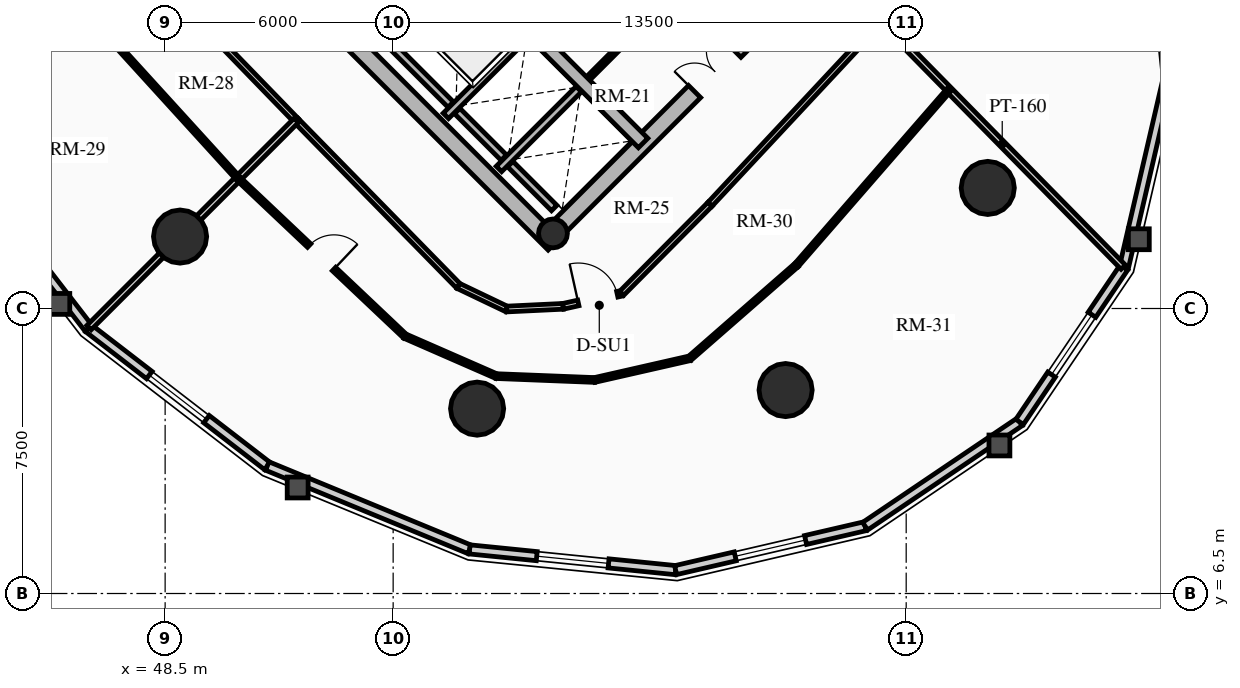
"""IFC4 building model, lengths in metres.
Left out: names, types, materials, properties, quantities, classifications, styles, units other than length and angle.
Written with IfcOpenShell. Run it as: python <this file> out.ifc"""

import sys

from ifc_helpers import new_model, si_unit, direction, frame, frame_2d, origin, origin_2d, place, context, subcontext, project, spatial, rectangle, circle, hollow_circle, extrude, source, transform, mapped, element, fill, save


model = new_model("IFC4")
c1 = context("Model", 3, precision=1e-05, world=origin(), true_north=direction((0.0, 1.0)))
c2 = subcontext(c1, "Body", "Model", "MODEL_VIEW")
j1 = project(units=[si_unit("LENGTHUNIT", "METRE"), si_unit("PLANEANGLEUNIT", "RADIAN")], contexts=[c1])
p1 = place(None, origin())
s1 = spatial("IfcSite", under=j1, at=p1, CompositionType="ELEMENT")
p2 = place(p1, origin())
s2 = spatial("IfcBuilding", under=s1, at=p2, CompositionType="ELEMENT")
p3 = place(p2, frame((0.0, 0.0, 90.52)))
s3 = spatial("IfcBuildingStorey", under=s2, at=p3, CompositionType="ELEMENT", Elevation=90.52)
p4 = place(p3, frame((58.737, 15.697, 0.0), z_axis=(0.0, 0.0, 1.0), x_axis=(-0.707106781187, 0.707106781187, 0.0)))
e1 = element("IfcWall", 1, at=p4, inside=s3, PredefinedType="SHEAR", context=c2, shape_type="SweptSolid", body=[
    extrude(rectangle(XDim=14.2, YDim=0.45, at=frame_2d((7.1, 0.0))), origin(), (0.0, 0.0, 1.0), 2.91),
])
p5 = place(p3, frame((58.578, 15.856, 0.0), z_axis=(0.0, 0.0, 1.0), x_axis=(0.707106781187, 0.707106781187, 0.0)))
e2 = element("IfcWall", 2, at=p5, inside=s3, PredefinedType="SHEAR", context=c2, shape_type="SweptSolid", body=[
    extrude(rectangle(XDim=10.7, YDim=0.45, at=frame_2d((5.35, 0.0))), origin(), (0.0, 0.0, 1.0), 2.91),
])
m1 = source(origin(), c2, "Body", "SweptSolid", [
    extrude(rectangle(XDim=1.5, YDim=2.02, at=frame_2d((0.75, 1.01))), frame((0.0, 0.235, 0.0), z_axis=(0.0, -1.0, 0.0), x_axis=(1.0, 0.0, 0.0)), (0.0, 0.0, 1.0), 0.47),
])
p6 = place(p5, frame((5.45, 0.0, 0.0)))
e3 = element("IfcOpeningElement", 3, at=p6, cuts=e2, PredefinedType="OPENING", context=c2, shape_type="MappedRepresentation", body=[
    mapped(m1, transform((0.0, 0.0, 0.0), x_axis=(1.0, 0.0, 0.0), y_axis=(0.0, 1.0, 0.0), z_axis=(0.0, 0.0, 1.0), scale=1.0)),
])
p7 = place(p3, frame((61.078, 18.355, 0.0), z_axis=(0.0, 0.0, 1.0), x_axis=(-0.707106781187, 0.707106781187, 0.0)))
e4 = element("IfcWall", 4, at=p7, inside=s3, PredefinedType="SHEAR", context=c2, shape_type="SweptSolid", body=[
    extrude(rectangle(XDim=13.75, YDim=0.35, at=frame_2d((6.875, 0.0))), origin(), (0.0, 0.0, 1.0), 2.91),
])
m2 = source(origin(), c2, "Body", "SweptSolid", [
    extrude(rectangle(XDim=1.1, YDim=2.015, at=frame_2d((0.55, 1.007))), frame((0.0, 0.185, 0.0), z_axis=(0.0, -1.0, 0.0), x_axis=(1.0, 0.0, 0.0)), (0.0, 0.0, 1.0), 0.37),
])
p8 = place(p7, frame((4.875, 0.0, 0.0)))
e5 = element("IfcOpeningElement", 5, at=p8, cuts=e4, PredefinedType="OPENING", context=c2, shape_type="MappedRepresentation", body=[
    mapped(m2, transform((0.0, 0.0, 0.0), x_axis=(1.0, 0.0, 0.0), y_axis=(0.0, 1.0, 0.0), z_axis=(0.0, 0.0, 1.0), scale=1.0)),
])
m3 = source(origin(), c2, "Body", "SweptSolid", [
    extrude(rectangle(XDim=1.15, YDim=2.02, at=frame_2d((0.575, 1.01))), frame((0.0, 0.185, 0.0), z_axis=(0.0, -1.0, 0.0), x_axis=(1.0, 0.0, 0.0)), (0.0, 0.0, 1.0), 0.37),
])
p9 = place(p7, frame((7.295, 0.0, 0.0)))
e6 = element("IfcOpeningElement", 6, at=p9, cuts=e4, PredefinedType="OPENING", context=c2, shape_type="MappedRepresentation", body=[
    mapped(m3, transform((0.0, 0.0, 0.0), x_axis=(1.0, 0.0, 0.0), y_axis=(0.0, 1.0, 0.0), z_axis=(0.0, 0.0, 1.0), scale=1.0)),
])
p10 = place(p3, frame((58.706, 15.976, 0.0), z_axis=(0.0, 0.0, 1.0), x_axis=(0.707106781187, 0.707106781187, 0.0)))
e7 = element("IfcColumn", 7, at=p10, inside=s3, PredefinedType="COLUMN", context=c2, shape_type="SweptSolid", body=[
    extrude(hollow_circle(Radius=0.38, WallThickness=0.032, at=origin_2d()), origin(), (0.0, 0.0, 1.0), 2.91),
])
for number, where, z_axis, x_axis in (
    (8, (48.893, 15.893, 0.0), (0.0, 0.0, 1.0), (1.0, 0.0, 0.0)),
    (9, (56.709, 11.365, 0.0), (0.0, 0.0, 1.0), (1.0, 0.0, 0.0)),
    (10, (64.827, 11.854, 0.0), (0.0, 0.0, 1.0), (1.0, 0.0, 0.0)),
    (11, (70.146, 17.173, 0.0), (0.0, 0.0, 1.0), (1.0, 0.0, 0.0)),
):
    element("IfcColumn", number, at=place(p3, frame(where, z_axis=z_axis, x_axis=x_axis)), inside=s3, PredefinedType="USERDEFINED", context=c2, shape_type="SweptSolid", body=[
        extrude(circle(Radius=0.7, at=origin_2d()), origin(), (0.0, 0.0, 1.0), 2.91),
    ])
p11 = place(p3, frame((46.483, 13.483, 0.0), z_axis=(0.0, 0.0, 1.0), x_axis=(-0.61054437102, 0.791982052206, 0.0)))
e12 = element("IfcWall", 12, at=p11, inside=s3, PredefinedType="SOLIDWALL", context=c2, shape_type="SweptSolid", body=[
    extrude(rectangle(XDim=5.942, YDim=0.24, at=frame_2d((2.971, 0.0))), origin(), (0.0, 0.0, 1.0), 2.179),
])
p12 = place(p3, frame((51.189, 9.855, 0.0), z_axis=(0.0, 0.0, 1.0), x_axis=(-0.791982052206, 0.61054437102, 0.0)))
e13 = element("IfcWall", 13, at=p12, inside=s3, PredefinedType="SOLIDWALL", context=c2, shape_type="SweptSolid", body=[
    extrude(rectangle(XDim=5.942, YDim=0.24, at=frame_2d((2.971, 0.0))), origin(), (0.0, 0.0, 1.0), 2.179),
])
m4 = source(origin(), c2, "Body", "SweptSolid", [
    extrude(rectangle(XDim=1.9, YDim=1.35, at=frame_2d((0.95, 0.675))), frame((0.0, 0.13, 0.0), z_axis=(0.0, -1.0, 0.0), x_axis=(1.0, 0.0, 0.0)), (0.0, 0.0, 1.0), 0.26),
])
p13 = place(p12, frame((2.021, 0.0, 0.65)))
e14 = element("IfcOpeningElement", 14, at=p13, cuts=e13, PredefinedType="OPENING", context=c2, shape_type="MappedRepresentation", body=[
    mapped(m4, transform((0.0, 0.0, 0.0), x_axis=(1.0, 0.0, 0.0), y_axis=(0.0, 1.0, 0.0), z_axis=(0.0, 0.0, 1.0), scale=1.0)),
])
p14 = place(p3, frame((56.513, 7.661, 0.0), z_axis=(0.0, 0.0, 1.0), x_axis=(-0.924563909604, 0.381027003055, 0.0)))
e15 = element("IfcWall", 15, at=p14, inside=s3, PredefinedType="SOLIDWALL", context=c2, shape_type="SweptSolid", body=[
    extrude(rectangle(XDim=5.758, YDim=0.24, at=frame_2d((2.879, 0.0))), origin(), (0.0, 0.0, 1.0), 2.179),
])
p15 = place(p3, frame((61.933, 7.115, 0.0), z_axis=(0.0, 0.0, 1.0), x_axis=(-0.994971754311, 0.10015591906, 0.0)))
e16 = element("IfcWall", 16, at=p15, inside=s3, PredefinedType="SOLIDWALL", context=c2, shape_type="SweptSolid", body=[
    extrude(rectangle(XDim=5.448, YDim=0.24, at=frame_2d((2.724, 0.0))), origin(), (0.0, 0.0, 1.0), 2.179),
])
p16 = place(p15, frame((1.774, 0.0, 0.65)))
e17 = element("IfcOpeningElement", 17, at=p16, cuts=e16, PredefinedType="OPENING", context=c2, shape_type="MappedRepresentation", body=[
    mapped(m4, transform((0.0, 0.0, 0.0), x_axis=(1.0, 0.0, 0.0), y_axis=(0.0, 1.0, 0.0), z_axis=(0.0, 0.0, 1.0), scale=1.0)),
])
p17 = place(p3, frame((66.92, 8.271, 0.0), z_axis=(0.0, 0.0, 1.0), x_axis=(-0.974165631126, -0.225834725257, 0.0)))
e18 = element("IfcWall", 18, at=p17, inside=s3, PredefinedType="SOLIDWALL", context=c2, shape_type="SweptSolid", body=[
    extrude(rectangle(XDim=5.119, YDim=0.24, at=frame_2d((2.56, 0.0))), origin(), (0.0, 0.0, 1.0), 2.179),
])
p18 = place(p17, frame((1.609, 0.0, 0.65)))
e19 = element("IfcOpeningElement", 19, at=p18, cuts=e18, PredefinedType="OPENING", context=c2, shape_type="MappedRepresentation", body=[
    mapped(m4, transform((0.0, 0.0, 0.0), x_axis=(1.0, 0.0, 0.0), y_axis=(0.0, 1.0, 0.0), z_axis=(0.0, 0.0, 1.0), scale=1.0)),
])
p19 = place(p3, frame((70.985, 11.015, 0.0), z_axis=(0.0, 0.0, 1.0), x_axis=(-0.828781148131, -0.559572880421, 0.0)))
e20 = element("IfcWall", 20, at=p19, inside=s3, PredefinedType="SOLIDWALL", context=c2, shape_type="SweptSolid", body=[
    extrude(rectangle(XDim=4.905, YDim=0.24, at=frame_2d((2.452, 0.0))), origin(), (0.0, 0.0, 1.0), 2.179),
])
p20 = place(p3, frame((73.729, 15.08, 0.0), z_axis=(0.0, 0.0, 1.0), x_axis=(-0.559572880421, -0.828781148131, 0.0)))
e21 = element("IfcWall", 21, at=p20, inside=s3, PredefinedType="SOLIDWALL", context=c2, shape_type="SweptSolid", body=[
    extrude(rectangle(XDim=4.905, YDim=0.24, at=frame_2d((2.452, 0.0))), origin(), (0.0, 0.0, 1.0), 2.179),
])
p21 = place(p20, frame((1.502, 0.0, 0.65)))
e22 = element("IfcOpeningElement", 22, at=p21, cuts=e21, PredefinedType="OPENING", context=c2, shape_type="MappedRepresentation", body=[
    mapped(m4, transform((0.0, 0.0, 0.0), x_axis=(1.0, 0.0, 0.0), y_axis=(0.0, 1.0, 0.0), z_axis=(0.0, 0.0, 1.0), scale=1.0)),
])
p22 = place(p3, frame((74.885, 20.067, 0.0), z_axis=(0.0, 0.0, 1.0), x_axis=(-0.225834725257, -0.974165631126, 0.0)))
e23 = element("IfcWall", 23, at=p22, inside=s3, PredefinedType="SOLIDWALL", context=c2, shape_type="SweptSolid", body=[
    extrude(rectangle(XDim=5.119, YDim=0.24, at=frame_2d((2.56, 0.0))), origin(), (0.0, 0.0, 1.0), 2.179),
])
p23 = place(p3, frame((74.339, 25.487, 0.0), z_axis=(0.0, 0.0, 1.0), x_axis=(0.10015591906, -0.994971754311, 0.0)))
e24 = element("IfcWall", 24, at=p23, inside=s3, PredefinedType="SOLIDWALL", context=c2, shape_type="SweptSolid", body=[
    extrude(rectangle(XDim=5.448, YDim=0.24, at=frame_2d((2.724, 0.0))), origin(), (0.0, 0.0, 1.0), 2.179),
])
m5 = source(origin(), c2, "Body", "SweptSolid", [
    extrude(rectangle(XDim=2.2, YDim=1.35, at=frame_2d((1.1, 0.675))), frame((0.0, 0.13, 0.0), z_axis=(0.0, -1.0, 0.0), x_axis=(1.0, 0.0, 0.0)), (0.0, 0.0, 1.0), 0.26),
])
p24 = place(p23, frame((1.624, 0.0, 0.65)))
e25 = element("IfcOpeningElement", 25, at=p24, cuts=e24, PredefinedType="OPENING", context=c2, shape_type="MappedRepresentation", body=[
    mapped(m5, transform((0.0, 0.0, 0.0), x_axis=(1.0, 0.0, 0.0), y_axis=(0.0, 1.0, 0.0), z_axis=(0.0, 0.0, 1.0), scale=1.0)),
])
p25 = place(p3, frame((55.888, 19.069, 0.0), z_axis=(0.0, 0.0, 1.0), x_axis=(0.707106781187, 0.707106781187, 0.0)))
e26 = element("IfcWall", 26, at=p25, inside=s3, PredefinedType="SHEAR", context=c2, shape_type="SweptSolid", body=[
    extrude(rectangle(XDim=2.97, YDim=0.2, at=frame_2d((1.485, 0.0))), origin(), (0.0, 0.0, 1.0), 2.91),
])
p26 = place(p3, frame((56.015, 19.366, 0.0), z_axis=(0.0, 0.0, 1.0), x_axis=(-0.707106781187, 0.707106781187, 0.0)))
e27 = element("IfcWall", 27, at=p26, inside=s3, PredefinedType="SHEAR", context=c2, shape_type="SweptSolid", body=[
    extrude(rectangle(XDim=2.44, YDim=0.2, at=frame_2d((1.22, 0.0))), origin(), (0.0, 0.0, 1.0), 2.91),
])
p27 = place(p3, frame((57.284, 17.673, 0.0), z_axis=(0.0, 0.0, 1.0), x_axis=(0.707147878904, 0.70706568108, 0.0)))
e28 = element("IfcWall", 28, at=p27, inside=s3, PredefinedType="SHEAR", context=c2, shape_type="SweptSolid", body=[
    extrude(rectangle(XDim=2.97, YDim=0.2, at=frame_2d((1.485, 0.0))), origin(), (0.0, 0.0, 1.0), 2.91),
])
p28 = place(p3, frame((57.412, 17.97, 0.0), z_axis=(0.0, 0.0, 1.0), x_axis=(-0.707106781187, 0.707106781187, 0.0)))
e29 = element("IfcWall", 29, at=p28, inside=s3, PredefinedType="SHEAR", context=c2, shape_type="SweptSolid", body=[
    extrude(rectangle(XDim=1.735, YDim=0.2, at=frame_2d((0.867, 0.0))), origin(), (0.0, 0.0, 1.0), 2.91),
])
p29 = place(p3, frame((58.737, 16.644, 0.0), z_axis=(0.0, 0.0, 1.0), x_axis=(-0.707032117043, 0.707181437447, 0.0)))
e30 = element("IfcWall", 30, at=p29, inside=s3, PredefinedType="SHEAR", context=c2, shape_type="SweptSolid", body=[
    extrude(rectangle(XDim=1.635, YDim=0.2, at=frame_2d((0.817, 0.0))), origin(), (0.0, 0.0, 1.0), 2.91),
])
p30 = place(p3, frame((59.643, 20.066, 0.0), z_axis=(0.0, 0.0, 1.0), x_axis=(0.707106781187, 0.707106781187, 0.0)))
e31 = element("IfcWall", 31, at=p30, inside=s3, PredefinedType="PARTITIONING", context=c2, shape_type="SweptSolid", body=[
    extrude(rectangle(XDim=1.1, YDim=0.125, at=frame_2d((0.55, 0.0))), origin(), (0.0, 0.0, 1.0), 2.655),
])
p31 = place(p3, frame((47.786, 23.242, 0.0), z_axis=(0.0, 0.0, 1.0), x_axis=(0.696183456981, -0.717863910659, 0.0)))
e32 = element("IfcWall", 32, at=p31, inside=s3, PredefinedType="PARTITIONING", context=c2, shape_type="SweptSolid", body=[
    extrude(rectangle(XDim=5.979, YDim=0.15, at=frame_2d((2.99, 0.0))), origin(), (0.0, 0.0, 1.0), 2.655),
])
p32 = place(p3, frame((51.949, 18.949, 0.0), z_axis=(0.0, 0.0, 1.0), x_axis=(0.699801520154, -0.714337337951, 0.0)))
e33 = element("IfcWall", 33, at=p32, inside=s3, PredefinedType="PARTITIONING", context=c2, shape_type="SweptSolid", body=[
    extrude(rectangle(XDim=6.097, YDim=0.15, at=frame_2d((3.048, 0.0))), origin(), (0.0, 0.0, 1.0), 2.225),
])
p33 = place(p3, frame((56.216, 14.594, 0.0), z_axis=(0.0, 0.0, 1.0), x_axis=(0.902219207281, -0.431277755064, 0.0)))
e34 = element("IfcWall", 34, at=p33, inside=s3, PredefinedType="PARTITIONING", context=c2, shape_type="SweptSolid", body=[
    extrude(rectangle(XDim=1.41, YDim=0.15, at=frame_2d((0.705, 0.0))), origin(), (0.0, 0.0, 1.0), 2.225),
])
p34 = place(p3, frame((57.488, 13.986, 0.0), z_axis=(0.0, 0.0, 1.0), x_axis=(0.998863298217, 0.047666670476, 0.0)))
e35 = element("IfcWall", 35, at=p34, inside=s3, PredefinedType="PARTITIONING", context=c2, shape_type="SweptSolid", body=[
    extrude(rectangle(XDim=1.485, YDim=0.15, at=frame_2d((0.743, 0.0))), origin(), (0.0, 0.0, 1.0), 2.225),
])
p35 = place(p3, frame((58.971, 14.057, 0.0), z_axis=(0.0, 0.0, 1.0), x_axis=(0.976085233804, 0.217388169756, 0.0)))
e36 = element("IfcWall", 36, at=p35, inside=s3, PredefinedType="PARTITIONING", context=c2, shape_type="SweptSolid", body=[
    extrude(rectangle(XDim=1.581, YDim=0.15, at=frame_2d((0.791, 0.0))), origin(), (0.0, 0.0, 1.0), 2.225),
])
m6 = source(origin(), c2, "Body", "SweptSolid", [
    extrude(rectangle(XDim=1.05, YDim=2.015, at=frame_2d((0.525, 1.007))), frame((0.0, 0.085, 0.0), z_axis=(0.0, -1.0, 0.0), x_axis=(1.0, 0.0, 0.0)), (0.0, 0.0, 1.0), 0.17),
])
p36 = place(p35, frame((0.411, 0.0, 0.0)))
e37 = element("IfcOpeningElement", 37, at=p36, cuts=e36, PredefinedType="OPENING", context=c2, shape_type="MappedRepresentation", body=[
    mapped(m6, transform((0.0, 0.0, 0.0), x_axis=(1.0, 0.0, 0.0), y_axis=(0.0, 1.0, 0.0), z_axis=(0.0, 0.0, 1.0), scale=1.0)),
])
p37 = place(p3, frame((60.515, 14.401, 0.0), z_axis=(0.0, 0.0, 1.0), x_axis=(0.704179607439, 0.710021887316, 0.0)))
e38 = element("IfcWall", 38, at=p37, inside=s3, PredefinedType="PARTITIONING", context=c2, shape_type="SweptSolid", body=[
    extrude(rectangle(XDim=3.301, YDim=0.15, at=frame_2d((1.651, 0.0))), origin(), (0.0, 0.0, 1.0), 2.225),
])
p38 = place(p3, frame((62.839, 16.745, 0.0), z_axis=(0.0, 0.0, 1.0), x_axis=(0.682386779427, 0.73099130177, 0.0)))
e39 = element("IfcWall", 39, at=p38, inside=s3, PredefinedType="PARTITIONING", context=c2, shape_type="SweptSolid", body=[
    extrude(rectangle(XDim=6.6, YDim=0.15, at=frame_2d((3.3, 0.0))), origin(), (0.0, 0.0, 1.0), 2.225),
])
p39 = place(p3, frame((51.949, 18.949, 0.0), z_axis=(0.0, 0.0, 1.0), x_axis=(-0.707106781187, -0.707106781187, 0.0)))
e40 = element("IfcWall", 40, at=p39, inside=s3, PredefinedType="PARTITIONING", context=c2, shape_type="SweptSolid", body=[
    extrude(rectangle(XDim=7.711, YDim=0.16, at=frame_2d((3.855, 0.0))), origin(), (0.0, 0.0, 1.0), 2.179),
])
p40 = place(p3, frame((67.343, 21.569, 0.0), z_axis=(0.0, 0.0, 1.0), x_axis=(0.700899237588, -0.713260302238, 0.0)))
e41 = element("IfcWall", 41, at=p40, inside=s3, PredefinedType="PARTITIONING", context=c2, shape_type="SweptSolid", body=[
    extrude(rectangle(XDim=9.085, YDim=0.16, at=frame_2d((4.543, 0.0))), origin(), (0.0, 0.0, 1.0), 2.179),
])
p41 = place(p3, frame((46.41, 21.83, 0.0), z_axis=(0.0, 0.0, 1.0), x_axis=(0.6732109009, -0.739450527696, 0.0)))
e42 = element("IfcWall", 42, at=p41, inside=s3, PredefinedType="PARTITIONING", context=c2, shape_type="SweptSolid", body=[
    extrude(rectangle(XDim=5.96, YDim=0.125, at=frame_2d((2.98, 0.0))), origin(), (0.0, 0.0, 1.0), 2.655),
])
p42 = place(p3, frame((50.423, 17.423, 0.0), z_axis=(0.0, 0.0, 1.0), x_axis=(0.726497320663, -0.68716929724, 0.0)))
e43 = element("IfcWall", 43, at=p42, inside=s3, PredefinedType="PARTITIONING", context=c2, shape_type="SweptSolid", body=[
    extrude(rectangle(XDim=6.04, YDim=0.125, at=frame_2d((3.02, 0.0))), origin(), (0.0, 0.0, 1.0), 2.225),
])
m7 = source(origin(), c2, "Body", "SweptSolid", [
    extrude(rectangle(XDim=0.9, YDim=2.005, at=frame_2d((0.45, 1.002))), frame((0.0, 0.073, 0.0), z_axis=(0.0, -1.0, 0.0), x_axis=(1.0, 0.0, 0.0)), (0.0, 0.0, 1.0), 0.145),
])
p43 = place(p42, frame((2.57, 0.0, 0.0)))
e44 = element("IfcOpeningElement", 44, at=p43, cuts=e43, PredefinedType="OPENING", context=c2, shape_type="MappedRepresentation", body=[
    mapped(m7, transform((0.0, 0.0, 0.0), x_axis=(1.0, 0.0, 0.0), y_axis=(0.0, 1.0, 0.0), z_axis=(0.0, 0.0, 1.0), scale=1.0)),
])
p44 = place(p3, frame((54.811, 13.272, 0.0), z_axis=(0.0, 0.0, 1.0), x_axis=(0.91625765715, -0.400589447831, 0.0)))
e45 = element("IfcWall", 45, at=p44, inside=s3, PredefinedType="PARTITIONING", context=c2, shape_type="SweptSolid", body=[
    extrude(rectangle(XDim=2.624, YDim=0.125, at=frame_2d((1.312, 0.0))), origin(), (0.0, 0.0, 1.0), 2.225),
])
p45 = place(p3, frame((57.215, 12.221, 0.0), z_axis=(0.0, 0.0, 1.0), x_axis=(0.999225050732, -0.039361122818, 0.0)))
e46 = element("IfcWall", 46, at=p45, inside=s3, PredefinedType="PARTITIONING", context=c2, shape_type="SweptSolid", body=[
    extrude(rectangle(XDim=2.586, YDim=0.125, at=frame_2d((1.293, 0.0))), origin(), (0.0, 0.0, 1.0), 2.655),
])
p46 = place(p3, frame((59.8, 12.119, 0.0), z_axis=(0.0, 0.0, 1.0), x_axis=(0.975045061532, 0.222007044895, 0.0)))
e47 = element("IfcWall", 47, at=p46, inside=s3, PredefinedType="PARTITIONING", context=c2, shape_type="SweptSolid", body=[
    extrude(rectangle(XDim=2.57, YDim=0.125, at=frame_2d((1.285, 0.0))), origin(), (0.0, 0.0, 1.0), 2.225),
])
p47 = place(p3, frame((62.306, 12.689, 0.0), z_axis=(0.0, 0.0, 1.0), x_axis=(0.753127589311, 0.657874482115, 0.0)))
e48 = element("IfcWall", 48, at=p47, inside=s3, PredefinedType="PARTITIONING", context=c2, shape_type="SweptSolid", body=[
    extrude(rectangle(XDim=3.732, YDim=0.125, at=frame_2d((1.866, 0.0))), origin(), (0.0, 0.0, 1.0), 2.225),
])
p48 = place(p3, frame((65.116, 15.145, 0.0), z_axis=(0.0, 0.0, 1.0), x_axis=(0.656272685344, 0.75452379848, 0.0)))
e49 = element("IfcWall", 49, at=p48, inside=s3, PredefinedType="PARTITIONING", context=c2, shape_type="SweptSolid", body=[
    extrude(rectangle(XDim=6.11, YDim=0.125, at=frame_2d((3.055, 0.0))), origin(), (0.0, 0.0, 1.0), 2.225),
])
m8 = source(origin(), c2, "Body", "SweptSolid", [
    extrude(rectangle(XDim=1.9, YDim=1.35, at=frame_2d((0.95, 0.675))), frame((0.0, 0.03, 0.0), z_axis=(0.0, -1.0, 0.0), x_axis=(1.0, 0.0, 0.0)), (0.0, 0.0, 1.0), 0.06),
])
p49 = place(p13, origin())
e50 = element("IfcWindow", 50, at=p49, inside=s3, PartitioningType="DOUBLE_PANEL_VERTICAL", PredefinedType="WINDOW", context=c2, shape_type="MappedRepresentation", body=[
    mapped(m8, transform((0.0, 0.0, 0.0), x_axis=(1.0, 0.0, 0.0), y_axis=(0.0, 1.0, 0.0), z_axis=(0.0, 0.0, 1.0), scale=1.0)),
])
fill(e14, e50)
p50 = place(p16, origin())
e51 = element("IfcWindow", 51, at=p50, inside=s3, PartitioningType="DOUBLE_PANEL_VERTICAL", PredefinedType="WINDOW", context=c2, shape_type="MappedRepresentation", body=[
    mapped(m8, transform((0.0, 0.0, 0.0), x_axis=(1.0, 0.0, 0.0), y_axis=(0.0, 1.0, 0.0), z_axis=(0.0, 0.0, 1.0), scale=1.0)),
])
fill(e17, e51)
p51 = place(p18, origin())
e52 = element("IfcWindow", 52, at=p51, inside=s3, PartitioningType="DOUBLE_PANEL_VERTICAL", PredefinedType="WINDOW", context=c2, shape_type="MappedRepresentation", body=[
    mapped(m8, transform((0.0, 0.0, 0.0), x_axis=(1.0, 0.0, 0.0), y_axis=(0.0, 1.0, 0.0), z_axis=(0.0, 0.0, 1.0), scale=1.0)),
])
fill(e19, e52)
p52 = place(p21, origin())
e53 = element("IfcWindow", 53, at=p52, inside=s3, PartitioningType="DOUBLE_PANEL_VERTICAL", PredefinedType="WINDOW", context=c2, shape_type="MappedRepresentation", body=[
    mapped(m8, transform((0.0, 0.0, 0.0), x_axis=(1.0, 0.0, 0.0), y_axis=(0.0, 1.0, 0.0), z_axis=(0.0, 0.0, 1.0), scale=1.0)),
])
fill(e22, e53)
m9 = source(origin(), c2, "Body", "SweptSolid", [
    extrude(rectangle(XDim=1.5, YDim=2.02, at=frame_2d((0.75, 1.01))), frame((0.0, 0.025, 0.0), z_axis=(0.0, -1.0, 0.0), x_axis=(1.0, 0.0, 0.0)), (0.0, 0.0, 1.0), 0.05),
])
p53 = place(p6, origin())
e54 = element("IfcDoor", 54, at=p53, inside=s3, OperationType="DOUBLE_DOOR_SINGLE_SWING", PredefinedType="DOOR", context=c2, shape_type="MappedRepresentation", body=[
    mapped(m9, transform((0.0, 0.0, 0.0), x_axis=(1.0, 0.0, 0.0), y_axis=(0.0, 1.0, 0.0), z_axis=(0.0, 0.0, 1.0), scale=1.0)),
])
fill(e3, e54)
m10 = source(origin(), c2, "Body", "SweptSolid", [
    extrude(rectangle(XDim=1.05, YDim=2.015, at=frame_2d((0.525, 1.007))), frame((0.0, 0.025, 0.0), z_axis=(0.0, -1.0, 0.0), x_axis=(1.0, 0.0, 0.0)), (0.0, 0.0, 1.0), 0.05),
])
p54 = place(p36, origin())
e55 = element("IfcDoor", 55, at=p54, inside=s3, OperationType="SINGLE_SWING_LEFT", PredefinedType="DOOR", context=c2, shape_type="MappedRepresentation", body=[
    mapped(m10, transform((0.0, 0.0, 0.0), x_axis=(1.0, 0.0, 0.0), y_axis=(0.0, 1.0, 0.0), z_axis=(0.0, 0.0, 1.0), scale=1.0)),
])
fill(e37, e55)
m11 = source(origin(), c2, "Body", "SweptSolid", [
    extrude(rectangle(XDim=0.9, YDim=2.005, at=frame_2d((0.45, 1.002))), frame((0.0, 0.025, 0.0), z_axis=(0.0, -1.0, 0.0), x_axis=(1.0, 0.0, 0.0)), (0.0, 0.0, 1.0), 0.05),
])
p55 = place(p43, origin())
e56 = element("IfcDoor", 56, at=p55, inside=s3, OperationType="SINGLE_SWING_RIGHT", PredefinedType="DOOR", context=c2, shape_type="MappedRepresentation", body=[
    mapped(m11, transform((0.0, 0.0, 0.0), x_axis=(1.0, 0.0, 0.0), y_axis=(0.0, 1.0, 0.0), z_axis=(0.0, 0.0, 1.0), scale=1.0)),
])
fill(e44, e56)
save(model, sys.argv[1])
